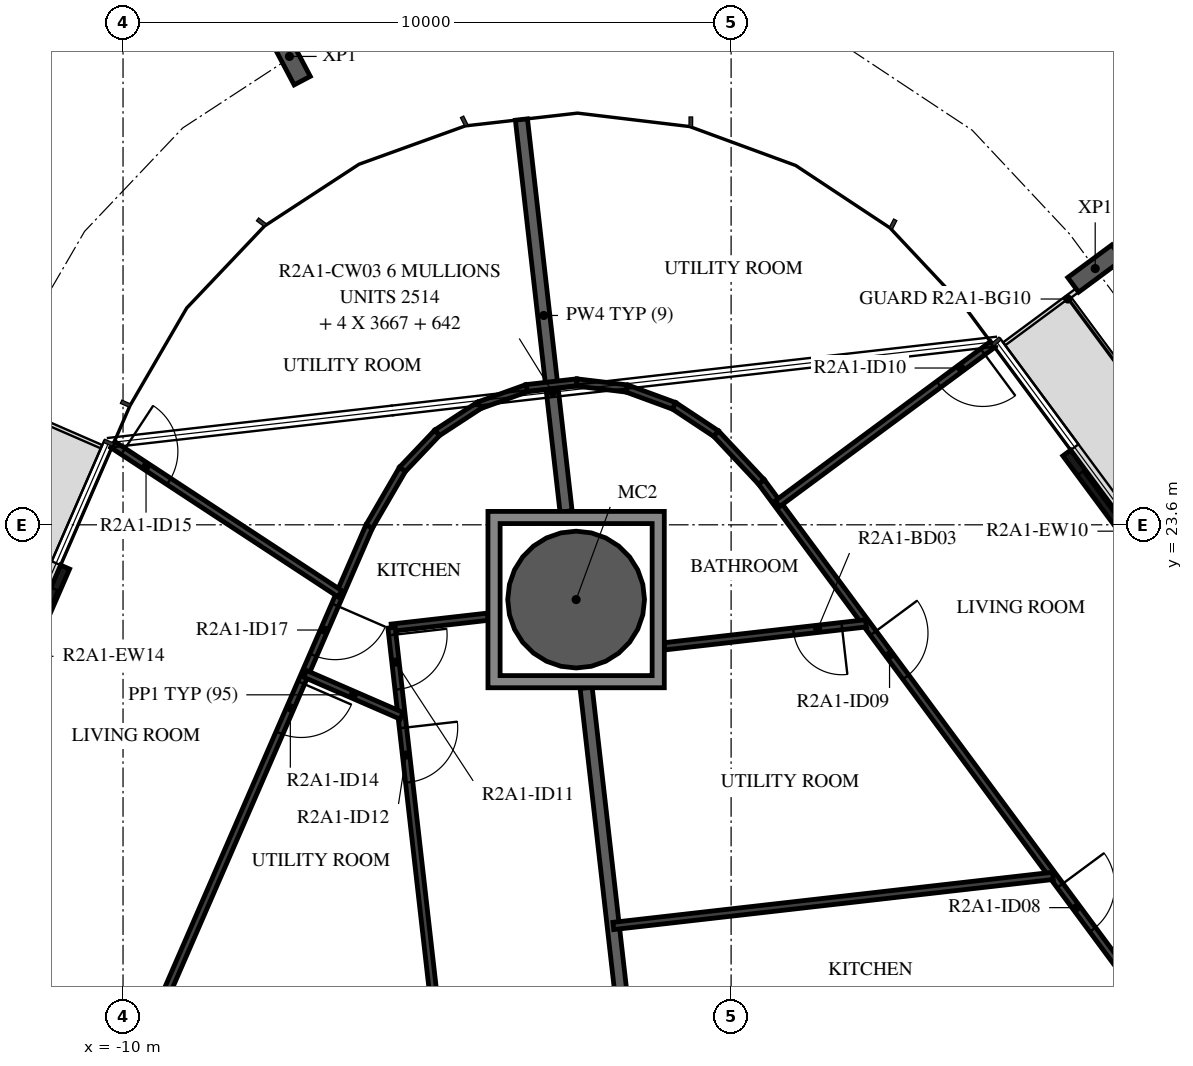
"""IFC4 building model, lengths in metres.
Left out: names, types, materials, properties, quantities, classifications, styles, units other than length and angle.
Written with IfcOpenShell. Run it as: python <this file> out.ifc"""

import sys

from ifc_helpers import new_model, si_unit, direction, frame, frame_2d, origin, origin_2d, place, context, subcontext, project, spatial, polyline, rectangle, hollow_circle, i_section, outline, extrude, element, fill, save


model = new_model("IFC4")
c1 = context("Model", 3, precision=1e-05, world=origin(), true_north=direction((0.0, 1.0)))
c2 = subcontext(c1, "Body", "Model", "MODEL_VIEW")
j1 = project(units=[si_unit("LENGTHUNIT", "METRE"), si_unit("PLANEANGLEUNIT", "RADIAN")], contexts=[c1])
p1 = place(None, origin())
s1 = spatial("IfcSite", under=j1, at=p1, CompositionType="ELEMENT")
p2 = place(p1, origin())
s2 = spatial("IfcBuilding", under=s1, at=p2, CompositionType="ELEMENT")
p3 = place(p2, frame((0.0, 0.0, 80.2)))
s3 = spatial("IfcBuildingStorey", under=s2, at=p3, CompositionType="ELEMENT", Elevation=80.2)
p4 = place(p3, frame((-2.549, 22.37, -0.38), z_axis=(0.0, 0.0, 1.0), x_axis=(1.0, 0.0, 0.0)))
e1 = element("IfcColumn", 1, at=p4, inside=s3, PredefinedType="COLUMN", context=c2, shape_type="SweptSolid", body=[
    extrude(hollow_circle(Radius=1.125, WallThickness=0.055, at=origin_2d()), origin(), (0.0, 0.0, 1.0), 3.5),
])
for number, where, z_axis, x_axis in (
    (2, (5.988, 27.814, -0.38), (0.0, 0.0, 1.0), (0.595, -0.804, 0.0)),
    (3, (-7.263, 31.302, -0.38), (0.0, 0.0, 1.0), (0.884, 0.467, 0.0)),
):
    element("IfcColumn", number, at=place(p3, frame(where, z_axis=z_axis, x_axis=x_axis)), inside=s3, PredefinedType="COLUMN", context=c2, shape_type="SweptSolid", body=[
        extrude(i_section(OverallWidth=0.3, OverallDepth=0.9, WebThickness=0.019, FlangeThickness=0.035, FilletRadius=0.03, at=origin_2d()), origin(), (0.0, 0.0, 1.0), 3.5),
    ])
p5 = place(p3, frame((7.423, 22.209, 0.0), z_axis=(0.0, 0.0, 1.0), x_axis=(-0.594811452818, 0.803865247163, 0.0)))
e4 = element("IfcWall", 4, at=p5, inside=s3, PredefinedType="STANDARD", context=c2, shape_type="SweptSolid", body=[
    extrude(rectangle(XDim=3.2, YDim=0.16, at=frame_2d((1.6, 0.0))), origin(), (0.0, 0.0, 1.0), 3.12),
])
p6 = place(p5, frame((0.4, 0.0, 0.0)))
e5 = element("IfcOpeningElement", 5, at=p6, cuts=e4, PredefinedType="OPENING", context=c2, shape_type="SweptSolid", body=[
    extrude(rectangle(XDim=2.4, YDim=2.4, at=frame_2d((1.2, 1.2))), frame((0.0, 0.09, 0.0), z_axis=(0.0, -1.0, 0.0), x_axis=(1.0, 0.0, 0.0)), (0.0, 0.0, 1.0), 0.18),
])
p7 = place(p3, frame((-10.953, 22.905, 0.0), z_axis=(0.0, 0.0, 1.0), x_axis=(-0.398784695066, -0.917044582876, 0.0)))
e6 = element("IfcWall", 6, at=p7, inside=s3, PredefinedType="STANDARD", context=c2, shape_type="SweptSolid", body=[
    extrude(rectangle(XDim=3.2, YDim=0.16, at=frame_2d((1.6, 0.0))), origin(), (0.0, 0.0, 1.0), 3.12),
])
p8 = place(p7, frame((0.4, 0.0, 0.0)))
e7 = element("IfcOpeningElement", 7, at=p8, cuts=e6, PredefinedType="OPENING", context=c2, shape_type="SweptSolid", body=[
    extrude(rectangle(XDim=2.4, YDim=2.4, at=frame_2d((1.2, 1.2))), frame((0.0, 0.09, 0.0), z_axis=(0.0, -1.0, 0.0), x_axis=(1.0, 0.0, 0.0)), (0.0, 0.0, 1.0), 0.18),
])
p9 = place(p3, frame((-2.385, 20.92, 0.0), z_axis=(0.0, 0.0, 1.0), x_axis=(0.113177776247, -0.993574753586, 0.0)))
e8 = element("IfcWall", 8, at=p9, inside=s3, PredefinedType="STANDARD", context=c2, shape_type="SweptSolid", body=[
    extrude(rectangle(XDim=7.356, YDim=0.2, at=frame_2d((3.678, 0.0))), origin(), (0.0, 0.0, 1.0), 3.12),
])
p10 = place(p3, frame((-3.448, 30.265, 0.0), z_axis=(0.0, 0.0, 1.0), x_axis=(0.113178237968, -0.993574700992, 0.0)))
e9 = element("IfcWall", 9, at=p10, inside=s3, PredefinedType="STANDARD", context=c2, shape_type="SweptSolid", body=[
    extrude(rectangle(XDim=6.487, YDim=0.2, at=frame_2d((3.243, 0.0))), origin(), (0.0, 0.0, 1.0), 3.12),
])
p11 = place(p3, frame((0.498, 24.306, 0.0), z_axis=(0.0, 0.0, 1.0), x_axis=(0.594826266513, -0.803854285718, 0.0)))
e10 = element("IfcWall", 10, at=p11, inside=s3, PredefinedType="PARTITIONING", context=c2, shape_type="SweptSolid", body=[
    extrude(rectangle(XDim=11.875, YDim=0.12, at=frame_2d((5.938, 0.0))), origin(), (0.0, 0.0, 1.0), 3.12),
])
p12 = place(p11, frame((8.26, 0.0, 0.0)))
e11 = element("IfcOpeningElement", 11, at=p12, cuts=e10, PredefinedType="OPENING", context=c2, shape_type="SweptSolid", body=[
    extrude(rectangle(XDim=0.9, YDim=2.1, at=frame_2d((0.45, 1.05))), frame((0.0, 0.07, 0.0), z_axis=(0.0, -1.0, 0.0), x_axis=(1.0, 0.0, 0.0)), (0.0, 0.0, 1.0), 0.14),
])
p13 = place(p11, frame((3.094, 0.0, 0.0)))
e12 = element("IfcOpeningElement", 12, at=p13, cuts=e10, PredefinedType="OPENING", context=c2, shape_type="SweptSolid", body=[
    extrude(rectangle(XDim=0.9, YDim=2.1, at=frame_2d((0.45, 1.05))), frame((0.0, 0.07, 0.0), z_axis=(0.0, -1.0, 0.0), x_axis=(1.0, 0.0, 0.0)), (0.0, 0.0, 1.0), 0.14),
])
p14 = place(p3, frame((4.299, 26.565, 0.0), z_axis=(0.0, 0.0, 1.0), x_axis=(-0.803851981262, -0.594829380764, 0.0)))
e13 = element("IfcWall", 13, at=p14, inside=s3, PredefinedType="PARTITIONING", context=c2, shape_type="SweptSolid", body=[
    extrude(rectangle(XDim=4.4, YDim=0.12, at=frame_2d((2.2, 0.0))), origin(), (0.0, 0.0, 1.0), 2.73),
])
p15 = place(p14, frame((0.2, 0.0, 0.0)))
e14 = element("IfcOpeningElement", 14, at=p15, cuts=e13, PredefinedType="OPENING", context=c2, shape_type="SweptSolid", body=[
    extrude(rectangle(XDim=0.9, YDim=2.1, at=frame_2d((0.45, 1.05))), frame((0.0, 0.07, 0.0), z_axis=(0.0, -1.0, 0.0), x_axis=(1.0, 0.0, 0.0)), (0.0, 0.0, 1.0), 0.14),
])
p16 = place(p3, frame((5.292, 17.827, 0.0), z_axis=(0.0, 0.0, 1.0), x_axis=(-0.993570041735, -0.113219133399, 0.0)))
e15 = element("IfcWall", 15, at=p16, inside=s3, PredefinedType="PARTITIONING", context=c2, shape_type="SweptSolid", body=[
    extrude(rectangle(XDim=7.276, YDim=0.12, at=frame_2d((3.638, 0.0))), origin(), (0.0, 0.0, 1.0), 3.12),
])
p17 = place(p3, frame((2.219, 21.979, 0.0), z_axis=(0.0, 0.0, 1.0), x_axis=(-0.99357408397, -0.113183654573, 0.0)))
e16 = element("IfcWall", 16, at=p17, inside=s3, PredefinedType="PARTITIONING", context=c2, shape_type="SweptSolid", body=[
    extrude(rectangle(XDim=3.339, YDim=0.12, at=frame_2d((1.669, 0.0))), origin(), (0.0, 0.0, 1.0), 3.12),
])
p18 = place(p17, frame((0.4, 0.0, 0.0)))
e17 = element("IfcOpeningElement", 17, at=p18, cuts=e16, PredefinedType="OPENING", context=c2, shape_type="SweptSolid", body=[
    extrude(rectangle(XDim=0.8, YDim=2.1, at=frame_2d((0.4, 1.05))), frame((0.0, 0.07, 0.0), z_axis=(0.0, -1.0, 0.0), x_axis=(1.0, 0.0, 0.0)), (0.0, 0.0, 1.0), 0.14),
])
for number, where, z_axis, x_axis in (
    (18, (-3.362, 25.846, 0.0), (0.0, 0.0, 1.0), (0.994, 0.113, 0.0)),
    (19, (-2.538, 25.94, 0.0), (0.0, 0.0, 1.0), (0.993, -0.119, 0.0)),
    (20, (-1.715, 25.842, 0.0), (0.0, 0.0, 1.0), (0.939, -0.345, 0.0)),
    (21, (-0.937, 25.556, 0.0), (0.0, 0.0, 1.0), (0.834, -0.552, 0.0)),
):
    element("IfcWall", number, at=place(p3, frame(where, z_axis=z_axis, x_axis=x_axis)), inside=s3, PredefinedType="PARTITIONING", context=c2, shape_type="SweptSolid", body=[
        extrude(rectangle(XDim=0.829, YDim=0.12, at=frame_2d((0.415, 0.0))), origin(), (0.0, 0.0, 1.0), 3.12),
    ])
p19 = place(p3, frame((-0.246, 25.098, 0.0), z_axis=(0.0, 0.0, 1.0), x_axis=(0.684172712488, -0.729320025426, 0.0)))
e22 = element("IfcWall", 22, at=p19, inside=s3, PredefinedType="PARTITIONING", context=c2, shape_type="SweptSolid", body=[
    extrude(rectangle(XDim=1.087, YDim=0.12, at=frame_2d((0.543, 0.0))), origin(), (0.0, 0.0, 1.0), 3.12),
])
p20 = place(p3, frame((-3.999, 22.089, 0.0), z_axis=(0.0, 0.0, 1.0), x_axis=(-0.993550908639, -0.113386912568, 0.0)))
e23 = element("IfcWall", 23, at=p20, inside=s3, PredefinedType="PARTITIONING", context=c2, shape_type="SweptSolid", body=[
    extrude(rectangle(XDim=1.595, YDim=0.12, at=frame_2d((0.798, 0.0))), origin(), (0.0, 0.0, 1.0), 3.12),
])
p21 = place(p3, frame((-5.584, 21.908, 0.0), z_axis=(0.0, 0.0, 1.0), x_axis=(0.113192725021, -0.993573050662, 0.0)))
e24 = element("IfcWall", 24, at=p21, inside=s3, PredefinedType="PARTITIONING", context=c2, shape_type="SweptSolid", body=[
    extrude(rectangle(XDim=7.2, YDim=0.12, at=frame_2d((3.6, 0.0))), origin(), (0.0, 0.0, 1.0), 3.12),
])
p22 = place(p21, frame((0.12, 0.0, 0.0)))
e25 = element("IfcOpeningElement", 25, at=p22, cuts=e24, PredefinedType="OPENING", context=c2, shape_type="SweptSolid", body=[
    extrude(rectangle(XDim=0.9, YDim=2.1, at=frame_2d((0.45, 1.05))), frame((0.0, 0.07, 0.0), z_axis=(0.0, -1.0, 0.0), x_axis=(1.0, 0.0, 0.0)), (0.0, 0.0, 1.0), 0.14),
])
p23 = place(p21, frame((1.658, 0.0, 0.0)))
e26 = element("IfcOpeningElement", 26, at=p23, cuts=e24, PredefinedType="OPENING", context=c2, shape_type="SweptSolid", body=[
    extrude(rectangle(XDim=0.9, YDim=2.1, at=frame_2d((0.45, 1.05))), frame((0.0, 0.07, 0.0), z_axis=(0.0, -1.0, 0.0), x_axis=(1.0, 0.0, 0.0)), (0.0, 0.0, 1.0), 0.14),
])
p24 = place(p3, frame((-3.362, 25.846, 0.0), z_axis=(0.0, 0.0, 1.0), x_axis=(-0.940718391217, -0.33918860303, 0.0)))
e27 = element("IfcWall", 27, at=p24, inside=s3, PredefinedType="PARTITIONING", context=c2, shape_type="SweptSolid", body=[
    extrude(rectangle(XDim=0.829, YDim=0.12, at=frame_2d((0.415, 0.0))), origin(), (0.0, 0.0, 1.0), 3.12),
])
p25 = place(p3, frame((-4.142, 25.565, 0.0), z_axis=(0.0, 0.0, 1.0), x_axis=(-0.837047461437, -0.547130283664, 0.0)))
e28 = element("IfcWall", 28, at=p25, inside=s3, PredefinedType="PARTITIONING", context=c2, shape_type="SweptSolid", body=[
    extrude(rectangle(XDim=0.829, YDim=0.12, at=frame_2d((0.414, 0.0))), origin(), (0.0, 0.0, 1.0), 3.12),
])
p26 = place(p3, frame((-4.835, 25.112, 0.0), z_axis=(0.0, 0.0, 1.0), x_axis=(-0.688463067416, -0.72527140079, 0.0)))
e29 = element("IfcWall", 29, at=p26, inside=s3, PredefinedType="PARTITIONING", context=c2, shape_type="SweptSolid", body=[
    extrude(rectangle(XDim=0.829, YDim=0.12, at=frame_2d((0.415, 0.0))), origin(), (0.0, 0.0, 1.0), 3.12),
])
p27 = place(p3, frame((-5.406, 24.51, 0.0), z_axis=(0.0, 0.0, 1.0), x_axis=(-0.502487709822, -0.864584351858, 0.0)))
e30 = element("IfcWall", 30, at=p27, inside=s3, PredefinedType="PARTITIONING", context=c2, shape_type="SweptSolid", body=[
    extrude(rectangle(XDim=1.087, YDim=0.12, at=frame_2d((0.543, 0.0))), origin(), (0.0, 0.0, 1.0), 3.12),
])
p28 = place(p3, frame((-5.952, 23.571, 0.0), z_axis=(0.0, 0.0, 1.0), x_axis=(-0.398745097158, -0.917061801348, 0.0)))
e31 = element("IfcWall", 31, at=p28, inside=s3, PredefinedType="PARTITIONING", context=c2, shape_type="SweptSolid", body=[
    extrude(rectangle(XDim=14.576, YDim=0.12, at=frame_2d((7.288, 0.0))), origin(), (0.0, 0.0, 1.0), 3.12),
])
p29 = place(p28, frame((2.801, 0.0, 0.0)))
e32 = element("IfcOpeningElement", 32, at=p29, cuts=e31, PredefinedType="OPENING", context=c2, shape_type="SweptSolid", body=[
    extrude(rectangle(XDim=0.9, YDim=2.1, at=frame_2d((0.45, 1.05))), frame((0.0, 0.07, 0.0), z_axis=(0.0, -1.0, 0.0), x_axis=(1.0, 0.0, 0.0)), (0.0, 0.0, 1.0), 0.14),
])
p30 = place(p28, frame((1.405, 0.0, 0.0)))
e33 = element("IfcOpeningElement", 33, at=p30, cuts=e31, PredefinedType="OPENING", context=c2, shape_type="SweptSolid", body=[
    extrude(rectangle(XDim=0.9, YDim=2.1, at=frame_2d((0.45, 1.05))), frame((0.0, 0.07, 0.0), z_axis=(0.0, -1.0, 0.0), x_axis=(1.0, 0.0, 0.0)), (0.0, 0.0, 1.0), 0.14),
])
p31 = place(p3, frame((-7.005, 21.149, 0.0), z_axis=(0.0, 0.0, 1.0), x_axis=(0.917081274718, -0.398700307953, 0.0)))
e34 = element("IfcWall", 34, at=p31, inside=s3, PredefinedType="PARTITIONING", context=c2, shape_type="SweptSolid", body=[
    extrude(rectangle(XDim=1.73, YDim=0.12, at=frame_2d((0.865, 0.0))), origin(), (0.0, 0.0, 1.0), 3.12),
])
p32 = place(p3, frame((-10.165, 24.917, 0.0), z_axis=(0.0, 0.0, 1.0), x_axis=(0.835849562932, -0.548958566876, 0.0)))
e35 = element("IfcWall", 35, at=p32, inside=s3, PredefinedType="PARTITIONING", context=c2, shape_type="SweptSolid", body=[
    extrude(rectangle(XDim=4.465, YDim=0.12, at=frame_2d((2.232, 0.0))), origin(), (0.0, 0.0, 1.0), 2.73),
])
p33 = place(p32, frame((0.2, 0.0, 0.0)))
e36 = element("IfcOpeningElement", 36, at=p33, cuts=e35, PredefinedType="OPENING", context=c2, shape_type="SweptSolid", body=[
    extrude(rectangle(XDim=0.9, YDim=2.1, at=frame_2d((0.45, 1.05))), frame((0.0, 0.07, 0.0), z_axis=(0.0, -1.0, 0.0), x_axis=(1.0, 0.0, 0.0)), (0.0, 0.0, 1.0), 0.14),
])
p34 = place(p3, frame((-13.163, 18.022, 0.0), z_axis=(0.0, 0.0, 1.0), x_axis=(0.594797671626, -0.803875444226, 0.0)))
e37 = element("IfcWall", 37, at=p34, inside=s3, PredefinedType="PARTITIONING", context=c2, shape_type="SweptSolid", body=[
    extrude(rectangle(XDim=5.081, YDim=0.12, at=frame_2d((2.54, 0.0))), origin(), (0.0, 0.0, 1.0), 3.12),
])
p35 = place(p34, frame((0.4, 0.0, 0.0)))
e38 = element("IfcOpeningElement", 38, at=p35, cuts=e37, PredefinedType="OPENING", context=c2, shape_type="SweptSolid", body=[
    extrude(rectangle(XDim=0.9, YDim=2.1, at=frame_2d((0.45, 1.05))), frame((0.0, 0.07, 0.0), z_axis=(0.0, -1.0, 0.0), x_axis=(1.0, 0.0, 0.0)), (0.0, 0.0, 1.0), 0.14),
])
p36 = place(p3, origin())
e39 = element("IfcWall", 39, at=p36, inside=s3, PredefinedType="STANDARD", context=c2, shape_type="SweptSolid", body=[
    extrude(outline(polyline([(-1.099, 23.82), (-1.099, 20.92), (-3.999, 20.92), (-3.999, 23.82), (-1.099, 23.82)]), holes=[polyline([(-3.799, 21.12), (-1.299, 21.12), (-1.299, 23.62), (-3.799, 23.62), (-3.799, 21.12)])]), origin(), (0.0, 0.0, 1.0), 3.12),
])
p37 = place(p6, origin())
e40 = element("IfcDoor", 40, at=p37, inside=s3, OperationType="DOUBLE_DOOR_SLIDING", PredefinedType="DOOR", context=c2, shape_type="SweptSolid", body=[
    extrude(rectangle(XDim=2.4, YDim=2.4, at=frame_2d((1.2, 1.2))), frame((0.0, 0.025, 0.0), z_axis=(0.0, -1.0, 0.0), x_axis=(1.0, 0.0, 0.0)), (0.0, 0.0, 1.0), 0.05),
])
fill(e5, e40)
p38 = place(p8, origin())
e41 = element("IfcDoor", 41, at=p38, inside=s3, OperationType="DOUBLE_DOOR_SLIDING", PredefinedType="DOOR", context=c2, shape_type="SweptSolid", body=[
    extrude(rectangle(XDim=2.4, YDim=2.4, at=frame_2d((1.2, 1.2))), frame((0.0, 0.025, 0.0), z_axis=(0.0, -1.0, 0.0), x_axis=(1.0, 0.0, 0.0)), (0.0, 0.0, 1.0), 0.05),
])
fill(e7, e41)
p39 = place(p12, origin())
e42 = element("IfcDoor", 42, at=p39, inside=s3, OperationType="SINGLE_SWING_RIGHT", PredefinedType="DOOR", context=c2, shape_type="SweptSolid", body=[
    extrude(rectangle(XDim=0.9, YDim=2.1, at=frame_2d((0.45, 1.05))), frame((0.0, 0.025, 0.0), z_axis=(0.0, -1.0, 0.0), x_axis=(1.0, 0.0, 0.0)), (0.0, 0.0, 1.0), 0.05),
])
fill(e11, e42)
p40 = place(p13, origin())
e43 = element("IfcDoor", 43, at=p40, inside=s3, OperationType="SINGLE_SWING_LEFT", PredefinedType="DOOR", context=c2, shape_type="SweptSolid", body=[
    extrude(rectangle(XDim=0.9, YDim=2.1, at=frame_2d((0.45, 1.05))), frame((0.0, 0.025, 0.0), z_axis=(0.0, -1.0, 0.0), x_axis=(1.0, 0.0, 0.0)), (0.0, 0.0, 1.0), 0.05),
])
fill(e12, e43)
p41 = place(p18, origin())
e44 = element("IfcDoor", 44, at=p41, inside=s3, OperationType="SINGLE_SWING_RIGHT", PredefinedType="DOOR", context=c2, shape_type="SweptSolid", body=[
    extrude(rectangle(XDim=0.8, YDim=2.1, at=frame_2d((0.4, 1.05))), frame((0.0, 0.025, 0.0), z_axis=(0.0, -1.0, 0.0), x_axis=(1.0, 0.0, 0.0)), (0.0, 0.0, 1.0), 0.05),
])
fill(e17, e44)
p42 = place(p15, origin())
e45 = element("IfcDoor", 45, at=p42, inside=s3, OperationType="SINGLE_SWING_RIGHT", PredefinedType="DOOR", context=c2, shape_type="SweptSolid", body=[
    extrude(rectangle(XDim=0.9, YDim=2.1, at=frame_2d((0.45, 1.05))), frame((0.0, 0.025, 0.0), z_axis=(0.0, -1.0, 0.0), x_axis=(1.0, 0.0, 0.0)), (0.0, 0.0, 1.0), 0.05),
])
fill(e14, e45)
p43 = place(p22, origin())
e46 = element("IfcDoor", 46, at=p43, inside=s3, OperationType="SINGLE_SWING_RIGHT", PredefinedType="DOOR", context=c2, shape_type="SweptSolid", body=[
    extrude(rectangle(XDim=0.9, YDim=2.1, at=frame_2d((0.45, 1.05))), frame((0.0, 0.025, 0.0), z_axis=(0.0, -1.0, 0.0), x_axis=(1.0, 0.0, 0.0)), (0.0, 0.0, 1.0), 0.05),
])
fill(e25, e46)
p44 = place(p23, origin())
e47 = element("IfcDoor", 47, at=p44, inside=s3, OperationType="SINGLE_SWING_LEFT", PredefinedType="DOOR", context=c2, shape_type="SweptSolid", body=[
    extrude(rectangle(XDim=0.9, YDim=2.1, at=frame_2d((0.45, 1.05))), frame((0.0, 0.025, 0.0), z_axis=(0.0, -1.0, 0.0), x_axis=(1.0, 0.0, 0.0)), (0.0, 0.0, 1.0), 0.05),
])
fill(e26, e47)
p45 = place(p29, origin())
e48 = element("IfcDoor", 48, at=p45, inside=s3, OperationType="SINGLE_SWING_LEFT", PredefinedType="DOOR", context=c2, shape_type="SweptSolid", body=[
    extrude(rectangle(XDim=0.9, YDim=2.1, at=frame_2d((0.45, 1.05))), frame((0.0, 0.025, 0.0), z_axis=(0.0, -1.0, 0.0), x_axis=(1.0, 0.0, 0.0)), (0.0, 0.0, 1.0), 0.05),
])
fill(e32, e48)
p46 = place(p33, origin())
e49 = element("IfcDoor", 49, at=p46, inside=s3, OperationType="SINGLE_SWING_LEFT", PredefinedType="DOOR", context=c2, shape_type="SweptSolid", body=[
    extrude(rectangle(XDim=0.9, YDim=2.1, at=frame_2d((0.45, 1.05))), frame((0.0, 0.025, 0.0), z_axis=(0.0, -1.0, 0.0), x_axis=(1.0, 0.0, 0.0)), (0.0, 0.0, 1.0), 0.05),
])
fill(e36, e49)
p47 = place(p30, origin())
e50 = element("IfcDoor", 50, at=p47, inside=s3, OperationType="SINGLE_SWING_RIGHT", PredefinedType="DOOR", context=c2, shape_type="SweptSolid", body=[
    extrude(rectangle(XDim=0.9, YDim=2.1, at=frame_2d((0.45, 1.05))), frame((0.0, 0.025, 0.0), z_axis=(0.0, -1.0, 0.0), x_axis=(1.0, 0.0, 0.0)), (0.0, 0.0, 1.0), 0.05),
])
fill(e33, e50)
save(model, sys.argv[1])
